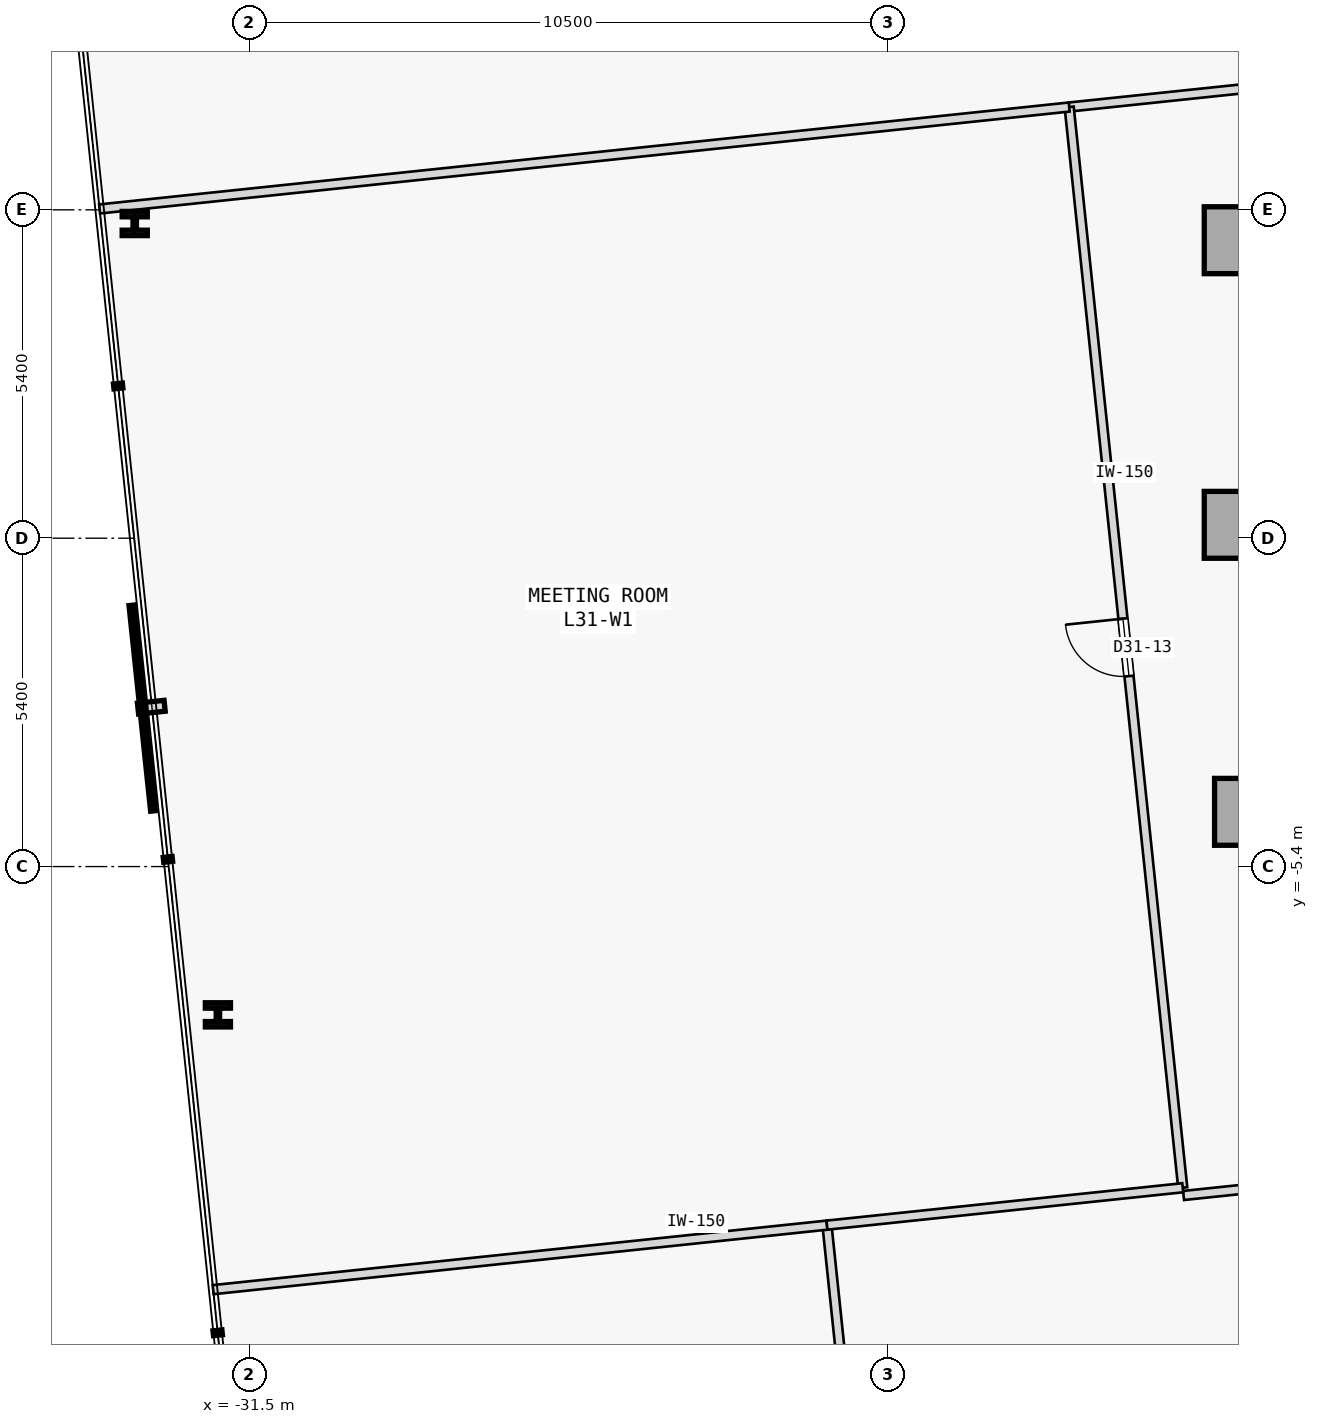
"""IFC4 building model, lengths in metres.
Left out: names, types, materials, properties, quantities, classifications, styles, units other than length and angle.
Written with IfcOpenShell. Run it as: python <this file> out.ifc"""

import sys

from ifc_helpers import new_model, si_unit, direction, frame, frame_2d, origin, origin_2d, place, context, subcontext, project, spatial, rectangle, i_section, extrude, element, fill, save


model = new_model("IFC4")
c1 = context("Model", 3, precision=1e-05, world=origin(), true_north=direction((0.0, 1.0)))
c2 = subcontext(c1, "Body", "Model", "MODEL_VIEW")
j1 = project(units=[si_unit("LENGTHUNIT", "METRE"), si_unit("PLANEANGLEUNIT", "RADIAN")], contexts=[c1])
p1 = place(None, origin())
s1 = spatial("IfcSite", under=j1, at=p1, CompositionType="ELEMENT")
p2 = place(p1, origin())
s2 = spatial("IfcBuilding", under=s1, at=p2, CompositionType="ELEMENT")
p3 = place(p2, frame((0.0, 0.0, 124.4)))
s3 = spatial("IfcBuildingStorey", under=s2, at=p3, CompositionType="ELEMENT", Elevation=124.4)
for number, where, z_axis, x_axis in (
    (1, (-15.25, 4.9, 0.0), (0.0, 0.0, 1.0), (1.0, 0.0, 0.0)),
    (2, (-15.25, 0.22, 0.0), (0.0, 0.0, 1.0), (1.0, 0.0, 0.0)),
    (3, (-15.08, -4.5, 0.0), (0.0, 0.0, 1.0), (1.0, 0.0, 0.0)),
):
    element("IfcColumn", number, at=place(p3, frame(where, z_axis=z_axis, x_axis=x_axis)), inside=s3, PredefinedType="COLUMN", context=c2, shape_type="SweptSolid", body=[
        extrude(rectangle(XDim=1.1, YDim=1.1, at=origin_2d()), origin(), (0.0, 0.0, 1.0), 3.7),
    ])
for number, where, z_axis, x_axis in (
    (4, (-33.388, 5.175, 0.0), (0.0, 0.0, 1.0), (1.0, 0.0, 0.0)),
    (5, (-32.021, -7.838, 0.0), (0.0, 0.0, 1.0), (1.0, 0.0, 0.0)),
):
    element("IfcColumn", number, at=place(p3, frame(where, z_axis=z_axis, x_axis=x_axis)), inside=s3, PredefinedType="COLUMN", context=c2, shape_type="SweptSolid", body=[
        extrude(i_section(OverallWidth=0.413, OverallDepth=0.398, WebThickness=0.056, FlangeThickness=0.089, FilletRadius=0.015, at=origin_2d()), origin(), (0.0, 0.0, 1.0), 3.7),
    ])
p4 = place(p3, frame((-18.021, 7.09, 0.0), z_axis=(0.0, 0.0, 1.0), x_axis=(0.994522981742, 0.104518126592, 0.0)))
e6 = element("IfcWall", 6, at=p4, inside=s3, PredefinedType="PARTITIONING", context=c2, shape_type="SweptSolid", body=[
    extrude(rectangle(XDim=8.617, YDim=0.15, at=frame_2d((4.309, 0.0))), origin(), (0.0, 0.0, 1.0), 3.475),
])
p5 = place(p4, frame((3.833, 0.0, 0.0)))
e7 = element("IfcOpeningElement", 7, at=p5, cuts=e6, PredefinedType="OPENING", context=c2, shape_type="SweptSolid", body=[
    extrude(rectangle(XDim=0.95, YDim=2.15, at=frame_2d((0.475, 1.075))), frame((0.0, 0.085, 0.0), z_axis=(0.0, -1.0, 0.0), x_axis=(1.0, 0.0, 0.0)), (0.0, 0.0, 1.0), 0.17),
])
p6 = place(p3, frame((-16.14, -10.809, 0.0), z_axis=(0.0, 0.0, 1.0), x_axis=(0.994520805081, 0.104538836136, 0.0)))
e8 = element("IfcWall", 8, at=p6, inside=s3, PredefinedType="PARTITIONING", context=c2, shape_type="SweptSolid", body=[
    extrude(rectangle(XDim=4.267, YDim=0.15, at=frame_2d((2.133, 0.0))), origin(), (0.0, 0.0, 1.0), 3.475),
])
p7 = place(p6, frame((1.658, 0.0, 0.0)))
e9 = element("IfcOpeningElement", 9, at=p7, cuts=e8, PredefinedType="OPENING", context=c2, shape_type="SweptSolid", body=[
    extrude(rectangle(XDim=0.95, YDim=2.15, at=frame_2d((0.475, 1.075))), frame((0.0, 0.085, 0.0), z_axis=(0.0, -1.0, 0.0), x_axis=(1.0, 0.0, 0.0)), (0.0, 0.0, 1.0), 0.17),
])
p8 = place(p3, frame((-16.153, -10.682, 0.0), z_axis=(0.0, 0.0, 1.0), x_axis=(-0.104527614588, 0.994521984568, 0.0)))
e10 = element("IfcWall", 10, at=p8, inside=s3, PredefinedType="PARTITIONING", context=c2, shape_type="SweptSolid", body=[
    extrude(rectangle(XDim=17.87, YDim=0.15, at=frame_2d((8.935, 0.0))), origin(), (0.0, 0.0, 1.0), 3.475),
])
p9 = place(p8, frame((8.46, 0.0, 0.0)))
e11 = element("IfcOpeningElement", 11, at=p9, cuts=e10, PredefinedType="OPENING", context=c2, shape_type="SweptSolid", body=[
    extrude(rectangle(XDim=0.95, YDim=2.15, at=frame_2d((0.475, 1.075))), frame((0.0, 0.085, 0.0), z_axis=(0.0, -1.0, 0.0), x_axis=(1.0, 0.0, 0.0)), (0.0, 0.0, 1.0), 0.17),
])
p10 = place(p3, frame((-33.967, 5.414, 0.0), z_axis=(0.0, 0.0, 1.0), x_axis=(0.994521211213, 0.104534972363, 0.0)))
e12 = element("IfcWall", 12, at=p10, inside=s3, PredefinedType="PARTITIONING", context=c2, shape_type="SweptSolid", body=[
    extrude(rectangle(XDim=16.033, YDim=0.15, at=frame_2d((8.017, 0.0))), origin(), (0.0, 0.0, 1.0), 3.475),
])
p11 = place(p3, frame((-20.727, -23.451, 0.0), z_axis=(0.0, 0.0, 1.0), x_axis=(-0.104522554453, 0.994522516392, 0.0)))
e13 = element("IfcWall", 13, at=p11, inside=s3, PredefinedType="PARTITIONING", context=c2, shape_type="SweptSolid", body=[
    extrude(rectangle(XDim=12.221, YDim=0.15, at=frame_2d((6.11, 0.0))), origin(), (0.0, 0.0, 1.0), 3.475),
])
p12 = place(p11, frame((5.635, 0.0, 0.0)))
e14 = element("IfcOpeningElement", 14, at=p12, cuts=e13, PredefinedType="OPENING", context=c2, shape_type="SweptSolid", body=[
    extrude(rectangle(XDim=0.95, YDim=2.15, at=frame_2d((0.475, 1.075))), frame((0.0, 0.085, 0.0), z_axis=(0.0, -1.0, 0.0), x_axis=(1.0, 0.0, 0.0)), (0.0, 0.0, 1.0), 0.17),
])
p13 = place(p3, frame((-32.099, -12.358, 0.0), z_axis=(0.0, 0.0, 1.0), x_axis=(0.994523757593, 0.104510743869, 0.0)))
e15 = element("IfcWall", 15, at=p13, inside=s3, PredefinedType="PARTITIONING", context=c2, shape_type="SweptSolid", body=[
    extrude(rectangle(XDim=10.15, YDim=0.15, at=frame_2d((5.075, 0.0))), origin(), (0.0, 0.0, 1.0), 3.475),
])
p14 = place(p3, frame((-22.004, -11.297, 0.0), z_axis=(0.0, 0.0, 1.0), x_axis=(0.994521131746, 0.10453572839, 0.0)))
e16 = element("IfcWall", 16, at=p14, inside=s3, PredefinedType="PARTITIONING", context=c2, shape_type="SweptSolid", body=[
    extrude(rectangle(XDim=5.883, YDim=0.15, at=frame_2d((2.941, 0.0))), origin(), (0.0, 0.0, 1.0), 3.475),
])
p15 = place(p9, origin())
e17 = element("IfcDoor", 17, at=p15, inside=s3, OperationType="SINGLE_SWING_RIGHT", PredefinedType="DOOR", context=c2, shape_type="SweptSolid", body=[
    extrude(rectangle(XDim=0.95, YDim=2.15, at=frame_2d((0.475, 1.075))), frame((0.0, 0.025, 0.0), z_axis=(0.0, -1.0, 0.0), x_axis=(1.0, 0.0, 0.0)), (0.0, 0.0, 1.0), 0.05),
])
fill(e11, e17)
save(model, sys.argv[1])
